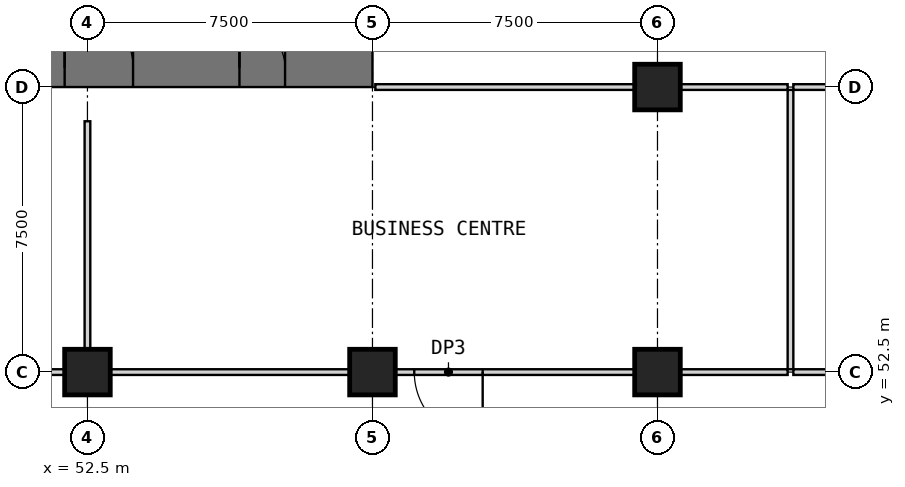
"""IFC4 building model, lengths in metres.
Left out: names, types, materials, properties, quantities, classifications, styles, units other than length and angle.
Written with IfcOpenShell. Run it as: python <this file> out.ifc"""

import sys

from ifc_helpers import new_model, si_unit, direction, frame, frame_2d, origin, origin_2d, place, context, subcontext, project, spatial, rectangle, extrude, element, fill, save


model = new_model("IFC4")
c1 = context("Model", 3, precision=1e-05, world=origin(), true_north=direction((0.0, 1.0)))
c2 = subcontext(c1, "Body", "Model", "MODEL_VIEW")
j1 = project(units=[si_unit("LENGTHUNIT", "METRE"), si_unit("PLANEANGLEUNIT", "RADIAN")], contexts=[c1])
p1 = place(None, origin())
s1 = spatial("IfcSite", under=j1, at=p1, CompositionType="ELEMENT")
p2 = place(p1, origin())
s2 = spatial("IfcBuilding", under=s1, at=p2, CompositionType="ELEMENT")
p3 = place(p2, frame((0.0, 0.0, 23.5)))
s3 = spatial("IfcBuildingStorey", under=s2, at=p3, CompositionType="ELEMENT", Elevation=23.5)
for number, where, z_axis, x_axis in (
    (1, (52.5, 52.5, 0.0), (0.0, 0.0, 1.0), (1.0, 0.0, 0.0)),
    (2, (60.0, 52.5, 0.0), (0.0, 0.0, 1.0), (1.0, 0.0, 0.0)),
    (3, (67.5, 52.5, 0.0), (0.0, 0.0, 1.0), (1.0, 0.0, 0.0)),
    (4, (67.5, 60.0, 0.0), (0.0, 0.0, 1.0), (1.0, 0.0, 0.0)),
):
    element("IfcColumn", number, at=place(p3, frame(where, z_axis=z_axis, x_axis=x_axis)), inside=s3, PredefinedType="COLUMN", context=c2, shape_type="SweptSolid", body=[
        extrude(rectangle(XDim=1.2, YDim=1.2, at=origin_2d()), origin(), (0.0, 0.0, 1.0), 5.5),
    ])
p4 = place(p3, frame((30.0, 60.5, 0.0), z_axis=(0.0, 0.0, 1.0), x_axis=(1.0, 0.0, 0.0)))
e5 = element("IfcWall", 5, at=p4, inside=s3, PredefinedType="SHEAR", context=c2, shape_type="SweptSolid", body=[
    extrude(rectangle(XDim=30.0, YDim=1.0, at=frame_2d((15.0, 0.0))), origin(), (0.0, 0.0, 1.0), 5.5),
])
p5 = place(p4, frame((21.9, 0.0, 0.0)))
e6 = element("IfcOpeningElement", 6, at=p5, cuts=e5, PredefinedType="OPENING", context=c2, shape_type="SweptSolid", body=[
    extrude(rectangle(XDim=1.8, YDim=2.1, at=frame_2d((0.9, 1.05))), frame((0.0, 0.51, 0.0), z_axis=(0.0, -1.0, 0.0), x_axis=(1.0, 0.0, 0.0)), (0.0, 0.0, 1.0), 1.02),
])
p6 = place(p4, frame((26.5, 0.0, 0.0)))
e7 = element("IfcOpeningElement", 7, at=p6, cuts=e5, PredefinedType="OPENING", context=c2, shape_type="SweptSolid", body=[
    extrude(rectangle(XDim=1.2, YDim=2.1, at=frame_2d((0.6, 1.05))), frame((0.0, 0.51, 0.0), z_axis=(0.0, -1.0, 0.0), x_axis=(1.0, 0.0, 0.0)), (0.0, 0.0, 1.0), 1.02),
])
p7 = place(p3, frame((51.9, 52.5, 0.0), z_axis=(0.0, 0.0, 1.0), x_axis=(-1.0, 0.0, 0.0)))
e8 = element("IfcWall", 8, at=p7, inside=s3, PredefinedType="PARTITIONING", context=c2, shape_type="SweptSolid", body=[
    extrude(rectangle(XDim=6.3, YDim=0.15, at=frame_2d((3.15, 0.0))), origin(), (0.0, 0.0, 1.0), 5.2),
])
p8 = place(p7, frame((4.0, 0.0, 0.0)))
e9 = element("IfcOpeningElement", 9, at=p8, cuts=e8, PredefinedType="OPENING", context=c2, shape_type="SweptSolid", body=[
    extrude(rectangle(XDim=1.8, YDim=2.4, at=frame_2d((0.9, 1.2))), frame((0.0, 0.085, 0.0), z_axis=(0.0, -1.0, 0.0), x_axis=(1.0, 0.0, 0.0)), (0.0, 0.0, 1.0), 0.17),
])
p9 = place(p3, frame((53.1, 52.5, 0.0), z_axis=(0.0, 0.0, 1.0), x_axis=(1.0, 0.0, 0.0)))
e10 = element("IfcWall", 10, at=p9, inside=s3, PredefinedType="PARTITIONING", context=c2, shape_type="SweptSolid", body=[
    extrude(rectangle(XDim=6.3, YDim=0.15, at=frame_2d((3.15, 0.0))), origin(), (0.0, 0.0, 1.0), 5.2),
])
p10 = place(p3, frame((66.9, 52.5, 0.0), z_axis=(0.0, 0.0, 1.0), x_axis=(-1.0, 0.0, 0.0)))
e11 = element("IfcWall", 11, at=p10, inside=s3, PredefinedType="PARTITIONING", context=c2, shape_type="SweptSolid", body=[
    extrude(rectangle(XDim=6.3, YDim=0.15, at=frame_2d((3.15, 0.0))), origin(), (0.0, 0.0, 1.0), 5.2),
])
p11 = place(p10, frame((4.0, 0.0, 0.0)))
e12 = element("IfcOpeningElement", 12, at=p11, cuts=e11, PredefinedType="OPENING", context=c2, shape_type="SweptSolid", body=[
    extrude(rectangle(XDim=1.8, YDim=2.4, at=frame_2d((0.9, 1.2))), frame((0.0, 0.085, 0.0), z_axis=(0.0, -1.0, 0.0), x_axis=(1.0, 0.0, 0.0)), (0.0, 0.0, 1.0), 0.17),
])
for number, where, z_axis, x_axis in (
    (13, (68.1, 52.5, 0.0), (0.0, 0.0, 1.0), (1.0, 0.0, 0.0)),
    (14, (71.075, 52.5, 0.0), (0.0, 0.0, 1.0), (1.0, 0.0, 0.0)),
):
    element("IfcWall", number, at=place(p3, frame(where, z_axis=z_axis, x_axis=x_axis)), inside=s3, PredefinedType="PARTITIONING", context=c2, shape_type="SweptSolid", body=[
        extrude(rectangle(XDim=2.825, YDim=0.15, at=frame_2d((1.413, 0.0))), origin(), (0.0, 0.0, 1.0), 5.2),
    ])
p12 = place(p3, frame((60.075, 60.0, 0.0), z_axis=(0.0, 0.0, 1.0), x_axis=(1.0, 0.0, 0.0)))
e15 = element("IfcWall", 15, at=p12, inside=s3, PredefinedType="PARTITIONING", context=c2, shape_type="SweptSolid", body=[
    extrude(rectangle(XDim=6.825, YDim=0.15, at=frame_2d((3.413, 0.0))), origin(), (0.0, 0.0, 1.0), 5.2),
])
for number, where, z_axis, x_axis in (
    (16, (68.1, 60.0, 0.0), (0.0, 0.0, 1.0), (1.0, 0.0, 0.0)),
    (17, (71.075, 60.0, 0.0), (0.0, 0.0, 1.0), (1.0, 0.0, 0.0)),
):
    element("IfcWall", number, at=place(p3, frame(where, z_axis=z_axis, x_axis=x_axis)), inside=s3, PredefinedType="PARTITIONING", context=c2, shape_type="SweptSolid", body=[
        extrude(rectangle(XDim=2.825, YDim=0.15, at=frame_2d((1.413, 0.0))), origin(), (0.0, 0.0, 1.0), 5.2),
    ])
p13 = place(p3, frame((52.5, 53.1, 0.0), z_axis=(0.0, 0.0, 1.0), x_axis=(0.0, 1.0, 0.0)))
e18 = element("IfcWall", 18, at=p13, inside=s3, PredefinedType="PARTITIONING", context=c2, shape_type="SweptSolid", body=[
    extrude(rectangle(XDim=6.0, YDim=0.15, at=frame_2d((3.0, 0.0))), origin(), (0.0, 0.0, 1.0), 5.2),
])
p14 = place(p3, frame((71.0, 52.575, 0.0), z_axis=(0.0, 0.0, 1.0), x_axis=(0.0, 1.0, 0.0)))
e19 = element("IfcWall", 19, at=p14, inside=s3, PredefinedType="PARTITIONING", context=c2, shape_type="SweptSolid", body=[
    extrude(rectangle(XDim=7.35, YDim=0.15, at=frame_2d((3.675, 0.0))), origin(), (0.0, 0.0, 1.0), 5.2),
])
p15 = place(p5, origin())
e20 = element("IfcDoor", 20, at=p15, inside=s3, OperationType="DOUBLE_DOOR_SINGLE_SWING", PredefinedType="DOOR", context=c2, shape_type="SweptSolid", body=[
    extrude(rectangle(XDim=1.8, YDim=2.1, at=frame_2d((0.9, 1.05))), frame((0.0, 0.025, 0.0), z_axis=(0.0, -1.0, 0.0), x_axis=(1.0, 0.0, 0.0)), (0.0, 0.0, 1.0), 0.05),
])
fill(e6, e20)
p16 = place(p6, origin())
e21 = element("IfcDoor", 21, at=p16, inside=s3, OperationType="SINGLE_SWING_LEFT", PredefinedType="DOOR", context=c2, shape_type="SweptSolid", body=[
    extrude(rectangle(XDim=1.2, YDim=2.1, at=frame_2d((0.6, 1.05))), frame((0.0, 0.025, 0.0), z_axis=(0.0, -1.0, 0.0), x_axis=(1.0, 0.0, 0.0)), (0.0, 0.0, 1.0), 0.05),
])
fill(e7, e21)
p17 = place(p11, origin())
e22 = element("IfcDoor", 22, at=p17, inside=s3, OperationType="SINGLE_SWING_LEFT", PredefinedType="DOOR", context=c2, shape_type="SweptSolid", body=[
    extrude(rectangle(XDim=1.8, YDim=2.4, at=frame_2d((0.9, 1.2))), frame((0.0, 0.025, 0.0), z_axis=(0.0, -1.0, 0.0), x_axis=(1.0, 0.0, 0.0)), (0.0, 0.0, 1.0), 0.05),
])
fill(e12, e22)
save(model, sys.argv[1])
